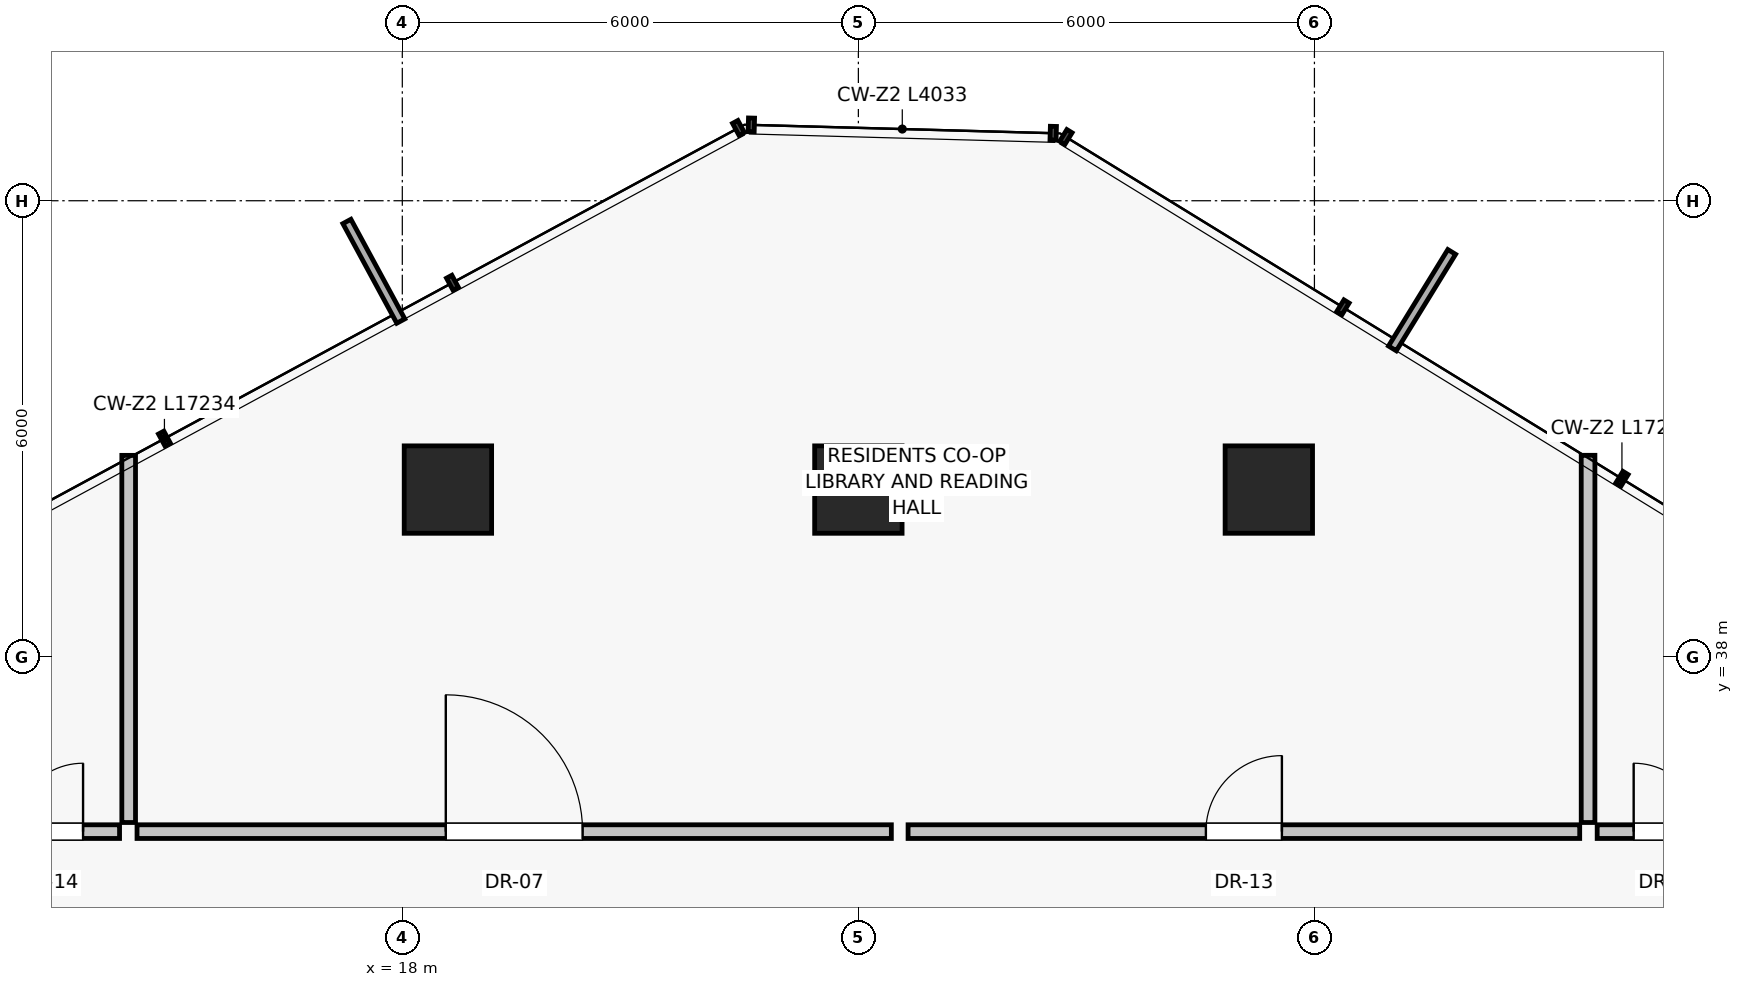
"""IFC4 building model, lengths in metres.
Left out: names, types, materials, properties, quantities, classifications, styles, units other than length and angle.
Written with IfcOpenShell. Run it as: python <this file> out.ifc"""

import sys

from ifc_helpers import new_model, si_unit, direction, frame, frame_2d, origin, origin_2d, place, context, subcontext, project, spatial, rectangle, extrude, source, transform, mapped, element, fill, save


model = new_model("IFC4")
c1 = context("Model", 3, precision=1e-05, world=origin(), true_north=direction((0.0, 1.0)))
c2 = subcontext(c1, "Body", "Model", "MODEL_VIEW")
j1 = project(units=[si_unit("LENGTHUNIT", "METRE"), si_unit("PLANEANGLEUNIT", "RADIAN")], contexts=[c1])
p1 = place(None, origin())
s1 = spatial("IfcSite", under=j1, at=p1, CompositionType="ELEMENT")
p2 = place(p1, origin())
s2 = spatial("IfcBuilding", under=s1, at=p2, CompositionType="ELEMENT")
p3 = place(p2, frame((0.0, 0.0, 123.0)))
s3 = spatial("IfcBuildingStorey", under=s2, at=p3, CompositionType="ELEMENT", Elevation=123.0)
for number, where, z_axis, x_axis in (
    (1, (29.4, 40.2, 0.0), (0.0, 0.0, 1.0), (1.0, 0.0, 0.0)),
    (2, (24.0, 40.2, 0.0), (0.0, 0.0, 1.0), (1.0, 0.0, 0.0)),
    (3, (18.6, 40.2, 0.0), (0.0, 0.0, 1.0), (1.0, 0.0, 0.0)),
):
    element("IfcColumn", number, at=place(p3, frame(where, z_axis=z_axis, x_axis=x_axis)), inside=s3, PredefinedType="COLUMN", context=c2, shape_type="SweptSolid", body=[
        extrude(rectangle(XDim=1.15, YDim=1.15, at=origin_2d()), origin(), (0.0, 0.0, 1.0), 3.25),
    ])
p4 = place(p3, frame((14.4, 35.82, 0.0), z_axis=(0.0, 0.0, 1.0), x_axis=(0.0, 1.0, 0.0)))
e4 = element("IfcWall", 4, at=p4, inside=s3, PredefinedType="PARTITIONING", context=c2, shape_type="SweptSolid", body=[
    extrude(rectangle(XDim=4.83, YDim=0.18, at=frame_2d((2.415, 0.0))), origin(), (0.0, 0.0, 1.0), 3.0),
])
p5 = place(p3, frame((33.6, 35.82, 0.0), z_axis=(0.0, 0.0, 1.0), x_axis=(0.0, 1.0, 0.0)))
e5 = element("IfcWall", 5, at=p5, inside=s3, PredefinedType="PARTITIONING", context=c2, shape_type="SweptSolid", body=[
    extrude(rectangle(XDim=4.831, YDim=0.18, at=frame_2d((2.416, 0.0))), origin(), (0.0, 0.0, 1.0), 3.0),
])
p6 = place(p3, frame((14.51, 35.7, 0.0), z_axis=(0.0, 0.0, 1.0), x_axis=(1.0, 0.0, 0.0)))
e6 = element("IfcWall", 6, at=p6, inside=s3, PredefinedType="PARTITIONING", context=c2, shape_type="SweptSolid", body=[
    extrude(rectangle(XDim=9.924, YDim=0.18, at=frame_2d((4.962, 0.0))), origin(), (0.0, 0.0, 1.0), 2.58),
])
p7 = place(p6, frame((4.062, 0.0, 0.0)))
e7 = element("IfcOpeningElement", 7, at=p7, cuts=e6, PredefinedType="OPENING", context=c2, shape_type="SweptSolid", body=[
    extrude(rectangle(XDim=1.8, YDim=2.25, at=frame_2d((0.9, 1.125))), frame((0.0, 0.1, 0.0), z_axis=(0.0, -1.0, 0.0), x_axis=(1.0, 0.0, 0.0)), (0.0, 0.0, 1.0), 0.2),
])
p8 = place(p3, frame((24.654, 35.7, 0.0), z_axis=(0.0, 0.0, 1.0), x_axis=(1.0, 0.0, 0.0)))
e8 = element("IfcWall", 8, at=p8, inside=s3, PredefinedType="PARTITIONING", context=c2, shape_type="SweptSolid", body=[
    extrude(rectangle(XDim=8.836, YDim=0.18, at=frame_2d((4.418, 0.0))), origin(), (0.0, 0.0, 1.0), 2.58),
])
p9 = place(p8, frame((3.918, 0.0, 0.0)))
e9 = element("IfcOpeningElement", 9, at=p9, cuts=e8, PredefinedType="OPENING", context=c2, shape_type="SweptSolid", body=[
    extrude(rectangle(XDim=1.0, YDim=2.01, at=frame_2d((0.5, 1.005))), frame((0.0, 0.1, 0.0), z_axis=(0.0, -1.0, 0.0), x_axis=(1.0, 0.0, 0.0)), (0.0, 0.0, 1.0), 0.2),
])
p10 = place(p3, frame((12.42, 35.7, 0.0), z_axis=(0.0, 0.0, 1.0), x_axis=(1.0, 0.0, 0.0)))
e10 = element("IfcWall", 10, at=p10, inside=s3, PredefinedType="PARTITIONING", context=c2, shape_type="SweptSolid", body=[
    extrude(rectangle(XDim=1.86, YDim=0.18, at=frame_2d((0.93, 0.0))), origin(), (0.0, 0.0, 1.0), 3.0),
])
p11 = place(p10, frame((0.48, 0.0, 0.0)))
e11 = element("IfcOpeningElement", 11, at=p11, cuts=e10, PredefinedType="OPENING", context=c2, shape_type="SweptSolid", body=[
    extrude(rectangle(XDim=0.9, YDim=2.01, at=frame_2d((0.45, 1.005))), frame((0.0, 0.1, 0.0), z_axis=(0.0, -1.0, 0.0), x_axis=(1.0, 0.0, 0.0)), (0.0, 0.0, 1.0), 0.2),
])
p12 = place(p3, frame((33.72, 35.7, 0.0), z_axis=(0.0, 0.0, 1.0), x_axis=(1.0, 0.0, 0.0)))
e12 = element("IfcWall", 12, at=p12, inside=s3, PredefinedType="PARTITIONING", context=c2, shape_type="SweptSolid", body=[
    extrude(rectangle(XDim=1.86, YDim=0.18, at=frame_2d((0.93, 0.0))), origin(), (0.0, 0.0, 1.0), 3.0),
])
p13 = place(p12, frame((0.48, 0.0, 0.0)))
e13 = element("IfcOpeningElement", 13, at=p13, cuts=e12, PredefinedType="OPENING", context=c2, shape_type="SweptSolid", body=[
    extrude(rectangle(XDim=0.9, YDim=2.01, at=frame_2d((0.45, 1.005))), frame((0.0, 0.1, 0.0), z_axis=(0.0, -1.0, 0.0), x_axis=(1.0, 0.0, 0.0)), (0.0, 0.0, 1.0), 0.2),
])
m1 = source(origin(), c2, "Body", "SweptSolid", [
    extrude(rectangle(XDim=1.8, YDim=2.25, at=frame_2d((0.9, 1.125))), frame((0.0, 0.025, 0.0), z_axis=(0.0, -1.0, 0.0), x_axis=(1.0, 0.0, 0.0)), (0.0, 0.0, 1.0), 0.05),
])
p14 = place(p7, origin())
e14 = element("IfcDoor", 14, at=p14, inside=s3, OperationType="SINGLE_SWING_LEFT", PredefinedType="DOOR", context=c2, shape_type="MappedRepresentation", body=[
    mapped(m1, transform((0.0, 0.0, 0.0), scale=1.0)),
])
fill(e7, e14)
m2 = source(origin(), c2, "Body", "SweptSolid", [
    extrude(rectangle(XDim=1.0, YDim=2.01, at=frame_2d((0.5, 1.005))), frame((0.0, 0.025, 0.0), z_axis=(0.0, -1.0, 0.0), x_axis=(1.0, 0.0, 0.0)), (0.0, 0.0, 1.0), 0.05),
])
p15 = place(p9, origin())
e15 = element("IfcDoor", 15, at=p15, inside=s3, OperationType="SINGLE_SWING_RIGHT", PredefinedType="DOOR", context=c2, shape_type="MappedRepresentation", body=[
    mapped(m2, transform((0.0, 0.0, 0.0), scale=1.0)),
])
fill(e9, e15)
m3 = source(origin(), c2, "Body", "SweptSolid", [
    extrude(rectangle(XDim=0.9, YDim=2.01, at=frame_2d((0.45, 1.005))), frame((0.0, 0.025, 0.0), z_axis=(0.0, -1.0, 0.0), x_axis=(1.0, 0.0, 0.0)), (0.0, 0.0, 1.0), 0.05),
])
p16 = place(p11, origin())
e16 = element("IfcDoor", 16, at=p16, inside=s3, OperationType="SINGLE_SWING_RIGHT", PredefinedType="DOOR", context=c2, shape_type="MappedRepresentation", body=[
    mapped(m3, transform((0.0, 0.0, 0.0), scale=1.0)),
])
fill(e11, e16)
p17 = place(p13, origin())
e17 = element("IfcDoor", 17, at=p17, inside=s3, OperationType="SINGLE_SWING_LEFT", PredefinedType="DOOR", context=c2, shape_type="MappedRepresentation", body=[
    mapped(m3, transform((0.0, 0.0, 0.0), scale=1.0)),
])
fill(e13, e17)
save(model, sys.argv[1])
